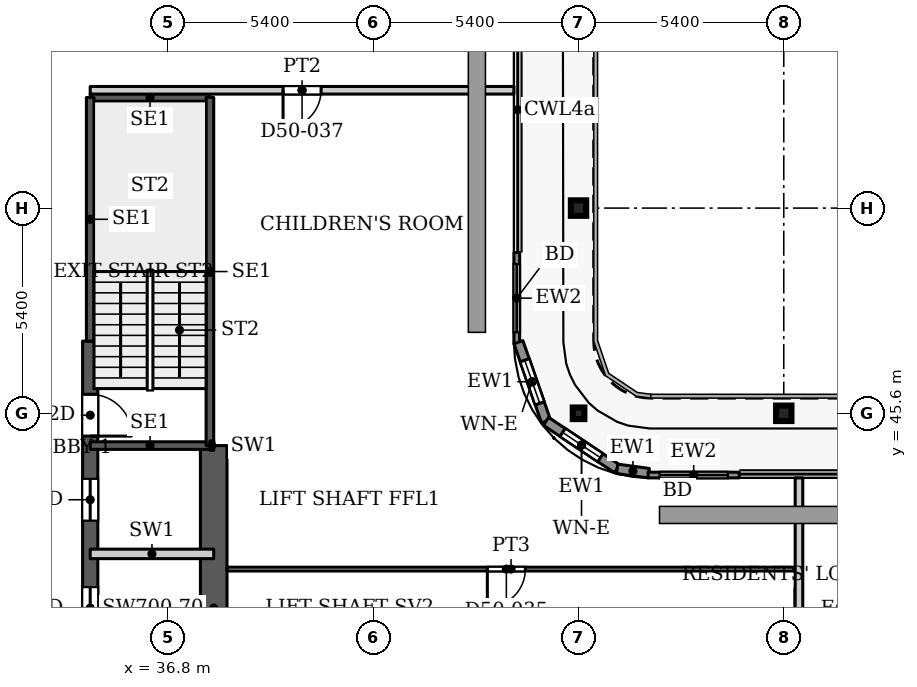
"""IFC4 building model, lengths in metres.
Left out: names, types, materials, properties, quantities, classifications, styles, units other than length and angle.
Written with IfcOpenShell. Run it as: python <this file> out.ifc"""

import sys

from ifc_helpers import new_model, si_unit, direction, frame, frame_2d, origin, origin_2d, place, context, subcontext, project, spatial, rectangle, hollow_rectangle, i_section, extrude, source, transform, mapped, element, fill, save


model = new_model("IFC4")
c1 = context("Model", 3, precision=1e-05, world=origin(), true_north=direction((0.0, 1.0)))
c2 = subcontext(c1, "Body", "Model", "MODEL_VIEW")
j1 = project(units=[si_unit("LENGTHUNIT", "METRE"), si_unit("PLANEANGLEUNIT", "RADIAN")], contexts=[c1])
p1 = place(None, origin())
s1 = spatial("IfcSite", under=j1, at=p1, CompositionType="ELEMENT")
p2 = place(p1, origin())
s2 = spatial("IfcBuilding", under=s1, at=p2, CompositionType="ELEMENT")
p3 = place(p2, frame((0.0, 0.0, 220.1)))
s3 = spatial("IfcBuildingStorey", under=s2, at=p3, CompositionType="ELEMENT", Elevation=220.1)
for number, where, z_axis, x_axis in (
    (1, (53.0, 45.6, 0.0), (0.0, 0.0, 1.0), (1.0, 0.0, 0.0)),
    (2, (47.6, 51.0, 0.0), (0.0, 0.0, 1.0), (1.0, 0.0, 0.0)),
):
    element("IfcColumn", number, at=place(p3, frame(where, z_axis=z_axis, x_axis=x_axis)), inside=s3, PredefinedType="COLUMN", context=c2, shape_type="SweptSolid", body=[
        extrude(i_section(OverallWidth=0.404, OverallDepth=0.407, WebThickness=0.027, FlangeThickness=0.044, FilletRadius=0.012, at=origin_2d()), origin(), (0.0, 0.0, 1.0), 3.9),
    ])
p4 = place(p3, frame((47.6, 45.6, 0.0), z_axis=(0.0, 0.0, 1.0), x_axis=(1.0, 0.0, 0.0)))
e3 = element("IfcColumn", 3, at=p4, inside=s3, PredefinedType="COLUMN", context=c2, shape_type="SweptSolid", body=[
    extrude(hollow_rectangle(XDim=0.305, YDim=0.305, WallThickness=0.016, InnerFilletRadius=0.016, OuterFilletRadius=0.032, at=origin_2d()), origin(), (0.0, 0.0, 1.0), 3.9),
])
p5 = place(p3, frame((34.75, 29.05, 0.0), z_axis=(0.0, 0.0, 1.0), x_axis=(0.0, 1.0, 0.0)))
e4 = element("IfcWall", 4, at=p5, inside=s3, PredefinedType="SHEAR", context=c2, shape_type="SweptSolid", body=[
    extrude(rectangle(XDim=18.45, YDim=0.4, at=frame_2d((9.225, 0.0))), origin(), (0.0, 0.0, 1.0), 3.9),
])
p6 = place(p5, frame((8.025, 0.0, 0.0)))
e5 = element("IfcOpeningElement", 5, at=p6, cuts=e4, PredefinedType="OPENING", context=c2, shape_type="SweptSolid", body=[
    extrude(rectangle(XDim=1.1, YDim=2.2, at=frame_2d((0.55, 1.1))), frame((0.0, 0.21, 0.0), z_axis=(0.0, -1.0, 0.0), x_axis=(1.0, 0.0, 0.0)), (0.0, 0.0, 1.0), 0.42),
])
p7 = place(p5, frame((10.875, 0.0, 0.0)))
e6 = element("IfcOpeningElement", 6, at=p7, cuts=e4, PredefinedType="OPENING", context=c2, shape_type="SweptSolid", body=[
    extrude(rectangle(XDim=1.1, YDim=2.2, at=frame_2d((0.55, 1.1))), frame((0.0, 0.21, 0.0), z_axis=(0.0, -1.0, 0.0), x_axis=(1.0, 0.0, 0.0)), (0.0, 0.0, 1.0), 0.42),
])
p8 = place(p5, frame((13.725, 0.0, 0.0)))
e7 = element("IfcOpeningElement", 7, at=p8, cuts=e4, PredefinedType="OPENING", context=c2, shape_type="SweptSolid", body=[
    extrude(rectangle(XDim=1.1, YDim=2.2, at=frame_2d((0.55, 1.1))), frame((0.0, 0.21, 0.0), z_axis=(0.0, -1.0, 0.0), x_axis=(1.0, 0.0, 0.0)), (0.0, 0.0, 1.0), 0.42),
])
p9 = place(p5, frame((15.95, 0.0, 0.0)))
e8 = element("IfcOpeningElement", 8, at=p9, cuts=e4, PredefinedType="OPENING", context=c2, shape_type="SweptSolid", body=[
    extrude(rectangle(XDim=1.1, YDim=2.2, at=frame_2d((0.55, 1.1))), frame((0.0, 0.21, 0.0), z_axis=(0.0, -1.0, 0.0), x_axis=(1.0, 0.0, 0.0)), (0.0, 0.0, 1.0), 0.42),
])
p10 = place(p3, frame((38.0, 36.2, 0.0), z_axis=(0.0, 0.0, 1.0), x_axis=(0.0, 1.0, 0.0)))
e9 = element("IfcWall", 9, at=p10, inside=s3, PredefinedType="SHEAR", context=c2, shape_type="SweptSolid", body=[
    extrude(rectangle(XDim=8.55, YDim=0.7, at=frame_2d((4.275, 0.0))), origin(), (0.0, 0.0, 1.0), 3.9),
])
p11 = place(p3, frame((45.975, 49.83, 0.0), z_axis=(0.0, 0.0, 1.0), x_axis=(0.0, -1.0, 0.0)))
e10 = element("IfcWall", 10, at=p11, inside=s3, PredefinedType="SOLIDWALL", context=c2, shape_type="SweptSolid", body=[
    extrude(rectangle(XDim=2.4, YDim=0.15, at=frame_2d((1.2, 0.0))), origin(), (0.0, 0.0, 1.0), 3.75),
])
p12 = place(p11, frame((0.3, 0.0, 0.0)))
e11 = element("IfcOpeningElement", 11, at=p12, cuts=e10, PredefinedType="OPENING", context=c2, shape_type="SweptSolid", body=[
    extrude(rectangle(XDim=1.8, YDim=2.4, at=frame_2d((0.9, 1.2))), frame((0.0, 0.085, 0.0), z_axis=(0.0, -1.0, 0.0), x_axis=(1.0, 0.0, 0.0)), (0.0, 0.0, 1.0), 0.17),
])
p13 = place(p3, frame((46.018, 47.471, 0.0), z_axis=(0.0, 0.0, 1.0), x_axis=(0.328791208903, -0.944402637093, 0.0)))
e12 = element("IfcWall", 12, at=p13, inside=s3, PredefinedType="SOLIDWALL", context=c2, shape_type="SweptSolid", body=[
    extrude(rectangle(XDim=2.205, YDim=0.25, at=frame_2d((1.102, 0.0))), origin(), (0.0, 0.0, 1.0), 3.75),
])
p14 = place(p13, frame((0.503, 0.0, 0.6)))
e13 = element("IfcOpeningElement", 13, at=p14, cuts=e12, PredefinedType="OPENING", context=c2, shape_type="SweptSolid", body=[
    extrude(rectangle(XDim=1.2, YDim=2.1, at=frame_2d((0.6, 1.05))), frame((0.0, 0.135, 0.0), z_axis=(0.0, -1.0, 0.0), x_axis=(1.0, 0.0, 0.0)), (0.0, 0.0, 1.0), 0.27),
])
p15 = place(p3, frame((46.743, 45.389, 0.0), z_axis=(0.0, 0.0, 1.0), x_axis=(0.831449265529, -0.555600682912, 0.0)))
e14 = element("IfcWall", 14, at=p15, inside=s3, PredefinedType="SOLIDWALL", context=c2, shape_type="SweptSolid", body=[
    extrude(rectangle(XDim=2.251, YDim=0.25, at=frame_2d((1.126, 0.0))), origin(), (0.0, 0.0, 1.0), 3.75),
])
p16 = place(p15, frame((0.525, 0.0, 0.6)))
e15 = element("IfcOpeningElement", 15, at=p16, cuts=e14, PredefinedType="OPENING", context=c2, shape_type="SweptSolid", body=[
    extrude(rectangle(XDim=1.2, YDim=2.1, at=frame_2d((0.6, 1.05))), frame((0.0, 0.135, 0.0), z_axis=(0.0, -1.0, 0.0), x_axis=(1.0, 0.0, 0.0)), (0.0, 0.0, 1.0), 0.27),
])
p17 = place(p3, frame((48.615, 44.138, 0.0), z_axis=(0.0, 0.0, 1.0), x_axis=(0.990741504246, -0.135761819977, 0.0)))
e16 = element("IfcWall", 16, at=p17, inside=s3, PredefinedType="SOLIDWALL", context=c2, shape_type="SweptSolid", body=[
    extrude(rectangle(XDim=0.84, YDim=0.25, at=frame_2d((0.42, 0.0))), origin(), (0.0, 0.0, 1.0), 3.75),
])
p18 = place(p3, frame((49.43, 43.975, 0.0), z_axis=(0.0, 0.0, 1.0), x_axis=(1.0, 0.0, 0.0)))
e17 = element("IfcWall", 17, at=p18, inside=s3, PredefinedType="SOLIDWALL", context=c2, shape_type="SweptSolid", body=[
    extrude(rectangle(XDim=2.4, YDim=0.15, at=frame_2d((1.2, 0.0))), origin(), (0.0, 0.0, 1.0), 3.75),
])
p19 = place(p18, frame((0.3, 0.0, 0.0)))
e18 = element("IfcOpeningElement", 18, at=p19, cuts=e17, PredefinedType="OPENING", context=c2, shape_type="SweptSolid", body=[
    extrude(rectangle(XDim=1.8, YDim=2.4, at=frame_2d((0.9, 1.2))), frame((0.0, 0.085, 0.0), z_axis=(0.0, -1.0, 0.0), x_axis=(1.0, 0.0, 0.0)), (0.0, 0.0, 1.0), 0.17),
])
for number, where, z_axis, x_axis in (
    (19, (34.75, 44.75, 0.0), (0.0, 0.0, 1.0), (1.0, 0.0, 0.0)),
    (20, (34.75, 53.91, 0.0), (0.0, 0.0, 1.0), (1.0, 0.0, 0.0)),
):
    element("IfcWall", number, at=place(p3, frame(where, z_axis=z_axis, x_axis=x_axis)), inside=s3, PredefinedType="SHEAR", context=c2, shape_type="SweptSolid", body=[
        extrude(rectangle(XDim=3.15, YDim=0.2, at=frame_2d((1.575, 0.0))), origin(), (0.0, 0.0, 1.0), 3.9),
    ])
p20 = place(p3, frame((34.75, 47.5, 0.0), z_axis=(0.0, 0.0, 1.0), x_axis=(0.0, 1.0, 0.0)))
e21 = element("IfcWall", 21, at=p20, inside=s3, PredefinedType="SHEAR", context=c2, shape_type="SweptSolid", body=[
    extrude(rectangle(XDim=6.41, YDim=0.2, at=frame_2d((3.205, 0.0))), origin(), (0.0, 0.0, 1.0), 3.9),
])
p21 = place(p3, frame((37.9, 44.75, 0.0), z_axis=(0.0, 0.0, 1.0), x_axis=(0.0, 1.0, 0.0)))
e22 = element("IfcWall", 22, at=p21, inside=s3, PredefinedType="SHEAR", context=c2, shape_type="SweptSolid", body=[
    extrude(rectangle(XDim=9.16, YDim=0.2, at=frame_2d((4.58, 0.0))), origin(), (0.0, 0.0, 1.0), 3.9),
])
p22 = place(p3, frame((34.75, 41.9, 0.0), z_axis=(0.0, 0.0, 1.0), x_axis=(1.0, 0.0, 0.0)))
e23 = element("IfcWall", 23, at=p22, inside=s3, PredefinedType="PARTITIONING", context=c2, shape_type="SweptSolid", body=[
    extrude(rectangle(XDim=3.25, YDim=0.25, at=frame_2d((1.625, 0.0))), origin(), (0.0, 0.0, 1.0), 3.9),
])
p23 = place(p3, frame((37.9, 44.75, 0.0), z_axis=(0.0, 0.0, 1.0), x_axis=(1.0, 0.0, 0.0)))
e24 = element("IfcWall", 24, at=p23, inside=s3, PredefinedType="PARTITIONING", context=c2, shape_type="SweptSolid", body=[
    extrude(rectangle(XDim=0.1, YDim=0.25, at=frame_2d((0.05, 0.0))), origin(), (0.0, 0.0, 1.0), 3.9),
])
p24 = place(p3, frame((34.75, 54.1, 0.0), z_axis=(0.0, 0.0, 1.0), x_axis=(1.0, 0.0, 0.0)))
e25 = element("IfcWall", 25, at=p24, inside=s3, PredefinedType="PARTITIONING", context=c2, shape_type="SweptSolid", body=[
    extrude(rectangle(XDim=11.15, YDim=0.2, at=frame_2d((5.575, 0.0))), origin(), (0.0, 0.0, 1.0), 3.6),
])
p25 = place(p24, frame((5.075, 0.0, 0.0)))
e26 = element("IfcOpeningElement", 26, at=p25, cuts=e25, PredefinedType="OPENING", context=c2, shape_type="SweptSolid", body=[
    extrude(rectangle(XDim=1.0, YDim=2.1, at=frame_2d((0.5, 1.05))), frame((0.0, 0.11, 0.0), z_axis=(0.0, -1.0, 0.0), x_axis=(1.0, 0.0, 0.0)), (0.0, 0.0, 1.0), 0.22),
])
p26 = place(p3, frame((38.349, 41.5, 0.0), z_axis=(0.0, 0.0, 1.0), x_axis=(1.0, 0.0, 0.0)))
e27 = element("IfcWall", 27, at=p26, inside=s3, PredefinedType="PARTITIONING", context=c2, shape_type="SweptSolid", body=[
    extrude(rectangle(XDim=14.951, YDim=0.1, at=frame_2d((7.476, 0.0))), origin(), (0.0, 0.0, 1.0), 3.6),
])
p27 = place(p26, frame((6.851, 0.0, 0.0)))
e28 = element("IfcOpeningElement", 28, at=p27, cuts=e27, PredefinedType="OPENING", context=c2, shape_type="SweptSolid", body=[
    extrude(rectangle(XDim=1.0, YDim=2.1, at=frame_2d((0.5, 1.05))), frame((0.0, 0.06, 0.0), z_axis=(0.0, -1.0, 0.0), x_axis=(1.0, 0.0, 0.0)), (0.0, 0.0, 1.0), 0.12),
])
p28 = place(p3, frame((53.4, 36.199, 0.0), z_axis=(0.0, 0.0, 1.0), x_axis=(0.0, 1.0, 0.0)))
e29 = element("IfcWall", 29, at=p28, inside=s3, PredefinedType="PARTITIONING", context=c2, shape_type="SweptSolid", body=[
    extrude(rectangle(XDim=7.701, YDim=0.2, at=frame_2d((3.851, 0.0))), origin(), (0.0, 0.0, 1.0), 3.6),
])
m1 = source(origin(), c2, "Body", "SweptSolid", [
    extrude(rectangle(XDim=1.8, YDim=2.4, at=frame_2d((0.9, 1.2))), frame((0.0, 0.025, 0.0), z_axis=(0.0, -1.0, 0.0), x_axis=(1.0, 0.0, 0.0)), (0.0, 0.0, 1.0), 0.05),
])
p29 = place(p12, origin())
e30 = element("IfcDoor", 30, at=p29, inside=s3, OperationType="SLIDING_TO_LEFT", PredefinedType="DOOR", context=c2, shape_type="MappedRepresentation", body=[
    mapped(m1, transform((0.0, 0.0, 0.0), x_axis=(1.0, 0.0, 0.0), y_axis=(0.0, 1.0, 0.0), z_axis=(0.0, 0.0, 1.0), scale=1.0)),
])
fill(e11, e30)
m2 = source(origin(), c2, "Body", "SweptSolid", [
    extrude(rectangle(XDim=1.2, YDim=2.1, at=frame_2d((0.6, 1.05))), frame((0.0, 0.03, 0.0), z_axis=(0.0, -1.0, 0.0), x_axis=(1.0, 0.0, 0.0)), (0.0, 0.0, 1.0), 0.06),
])
p30 = place(p14, origin())
e31 = element("IfcWindow", 31, at=p30, inside=s3, PartitioningType="SINGLE_PANEL", PredefinedType="WINDOW", context=c2, shape_type="MappedRepresentation", body=[
    mapped(m2, transform((0.0, 0.0, 0.0), x_axis=(1.0, 0.0, 0.0), y_axis=(0.0, 1.0, 0.0), z_axis=(0.0, 0.0, 1.0), scale=1.0)),
])
fill(e13, e31)
p31 = place(p16, origin())
e32 = element("IfcWindow", 32, at=p31, inside=s3, PartitioningType="SINGLE_PANEL", PredefinedType="WINDOW", context=c2, shape_type="MappedRepresentation", body=[
    mapped(m2, transform((0.0, 0.0, 0.0), x_axis=(1.0, 0.0, 0.0), y_axis=(0.0, 1.0, 0.0), z_axis=(0.0, 0.0, 1.0), scale=1.0)),
])
fill(e15, e32)
p32 = place(p19, origin())
e33 = element("IfcDoor", 33, at=p32, inside=s3, OperationType="SLIDING_TO_LEFT", PredefinedType="DOOR", context=c2, shape_type="MappedRepresentation", body=[
    mapped(m1, transform((0.0, 0.0, 0.0), x_axis=(1.0, 0.0, 0.0), y_axis=(0.0, 1.0, 0.0), z_axis=(0.0, 0.0, 1.0), scale=1.0)),
])
fill(e18, e33)
m3 = source(origin(), c2, "Body", "SweptSolid", [
    extrude(rectangle(XDim=1.1, YDim=2.2, at=frame_2d((0.55, 1.1))), frame((0.0, 0.025, 0.0), z_axis=(0.0, -1.0, 0.0), x_axis=(1.0, 0.0, 0.0)), (0.0, 0.0, 1.0), 0.05),
])
p33 = place(p7, origin())
e34 = element("IfcDoor", 34, at=p33, inside=s3, OperationType="SLIDING_TO_LEFT", PredefinedType="DOOR", context=c2, shape_type="MappedRepresentation", body=[
    mapped(m3, transform((0.0, 0.0, 0.0), x_axis=(1.0, 0.0, 0.0), y_axis=(0.0, 1.0, 0.0), z_axis=(0.0, 0.0, 1.0), scale=1.0)),
])
fill(e6, e34)
p34 = place(p8, origin())
e35 = element("IfcDoor", 35, at=p34, inside=s3, OperationType="SLIDING_TO_LEFT", PredefinedType="DOOR", context=c2, shape_type="MappedRepresentation", body=[
    mapped(m3, transform((0.0, 0.0, 0.0), x_axis=(1.0, 0.0, 0.0), y_axis=(0.0, 1.0, 0.0), z_axis=(0.0, 0.0, 1.0), scale=1.0)),
])
fill(e7, e35)
m4 = source(origin(), c2, "Body", "SweptSolid", [
    extrude(rectangle(XDim=1.1, YDim=2.2, at=frame_2d((0.55, 1.1))), frame((0.0, 0.025, 0.0), z_axis=(0.0, -1.0, 0.0), x_axis=(1.0, 0.0, 0.0)), (0.0, 0.0, 1.0), 0.05),
])
p35 = place(p9, origin())
e36 = element("IfcDoor", 36, at=p35, inside=s3, OperationType="SINGLE_SWING_RIGHT", PredefinedType="DOOR", context=c2, shape_type="MappedRepresentation", body=[
    mapped(m4, transform((0.0, 0.0, 0.0), x_axis=(1.0, 0.0, 0.0), y_axis=(0.0, 1.0, 0.0), z_axis=(0.0, 0.0, 1.0), scale=1.0)),
])
fill(e8, e36)
m5 = source(origin(), c2, "Body", "SweptSolid", [
    extrude(rectangle(XDim=1.0, YDim=2.1, at=frame_2d((0.5, 1.05))), frame((0.0, 0.025, 0.0), z_axis=(0.0, -1.0, 0.0), x_axis=(1.0, 0.0, 0.0)), (0.0, 0.0, 1.0), 0.05),
])
p36 = place(p27, origin())
e37 = element("IfcDoor", 37, at=p36, inside=s3, OperationType="SINGLE_SWING_RIGHT", PredefinedType="DOOR", context=c2, shape_type="MappedRepresentation", body=[
    mapped(m5, transform((0.0, 0.0, 0.0), x_axis=(1.0, 0.0, 0.0), y_axis=(0.0, 1.0, 0.0), z_axis=(0.0, 0.0, 1.0), scale=1.0)),
])
fill(e28, e37)
m6 = source(origin(), c2, "Body", "SweptSolid", [
    extrude(rectangle(XDim=1.0, YDim=2.1, at=frame_2d((0.5, 1.05))), frame((0.0, 0.025, 0.0), z_axis=(0.0, -1.0, 0.0), x_axis=(1.0, 0.0, 0.0)), (0.0, 0.0, 1.0), 0.05),
])
p37 = place(p25, origin())
e38 = element("IfcDoor", 38, at=p37, inside=s3, OperationType="SINGLE_SWING_RIGHT", PredefinedType="DOOR", context=c2, shape_type="MappedRepresentation", body=[
    mapped(m6, transform((0.0, 0.0, 0.0), x_axis=(1.0, 0.0, 0.0), y_axis=(0.0, 1.0, 0.0), z_axis=(0.0, 0.0, 1.0), scale=1.0)),
])
fill(e26, e38)
save(model, sys.argv[1])
